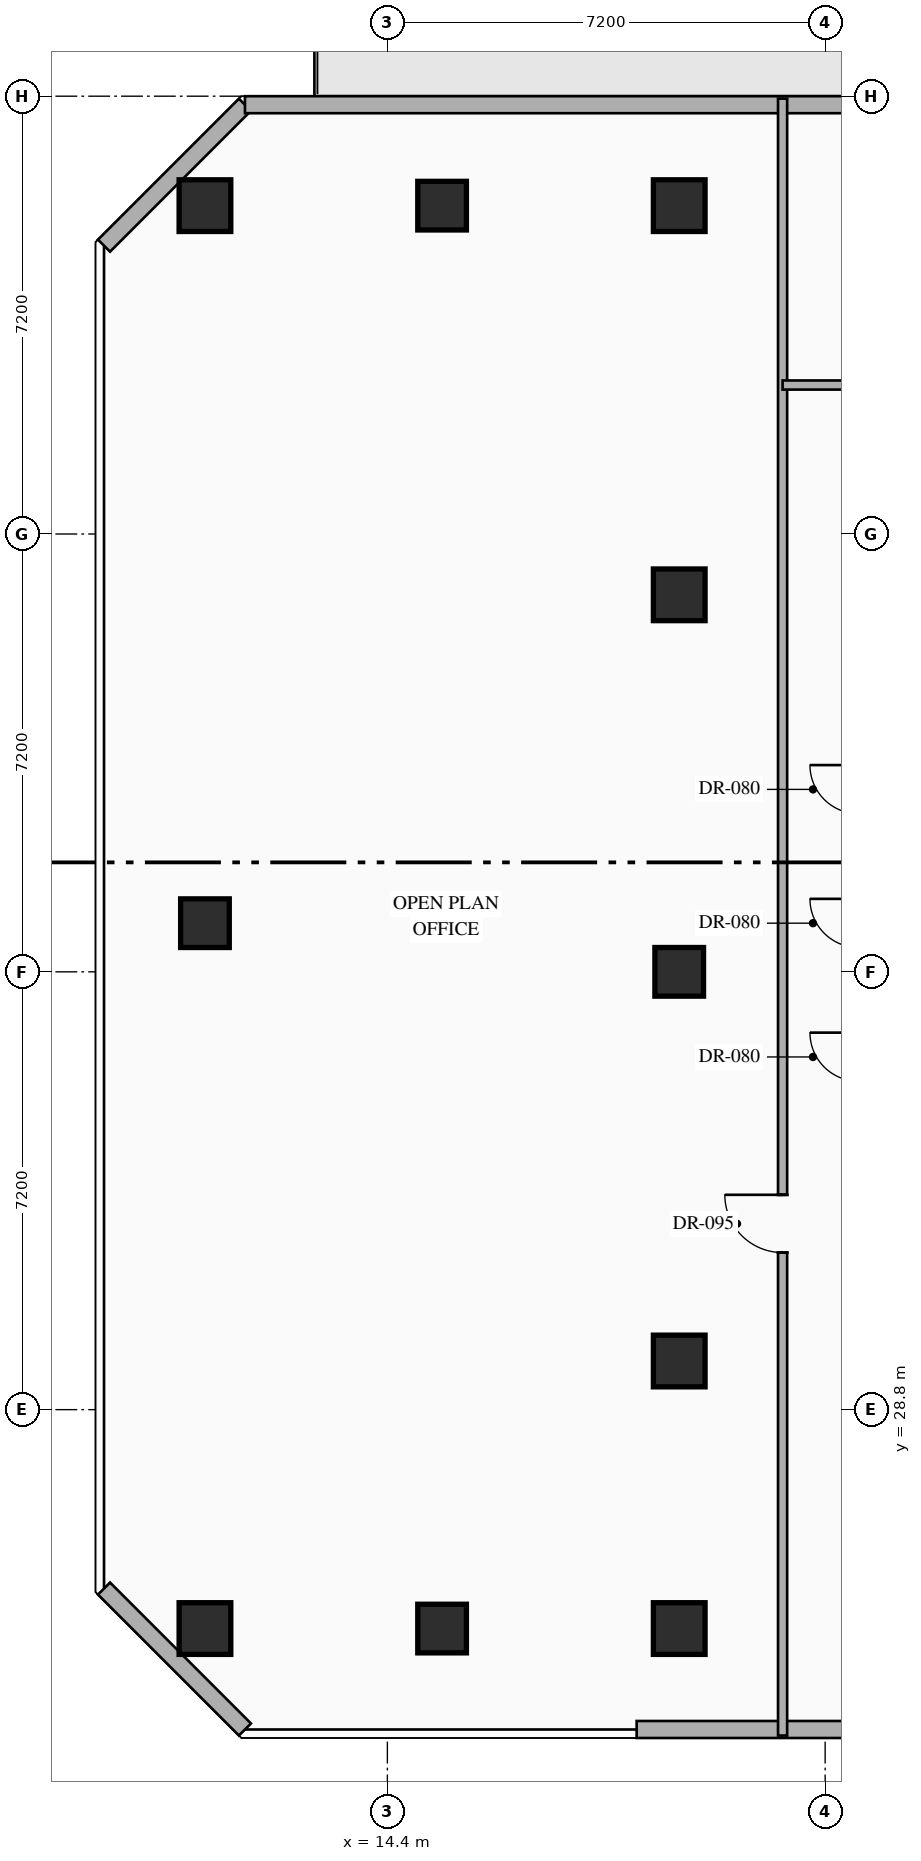
"""IFC4 building model, lengths in metres.
Left out: names, types, materials, properties, quantities, classifications, styles, units other than length and angle.
Written with IfcOpenShell. Run it as: python <this file> out.ifc"""

import sys

from ifc_helpers import new_model, si_unit, direction, frame, frame_2d, origin, origin_2d, place, context, subcontext, project, spatial, rectangle, hollow_rectangle, extrude, element, fill, save


model = new_model("IFC4")
c1 = context("Model", 3, precision=1e-05, world=origin(), true_north=direction((0.0, 1.0)))
c2 = subcontext(c1, "Body", "Model", "MODEL_VIEW")
j1 = project(units=[si_unit("LENGTHUNIT", "METRE"), si_unit("PLANEANGLEUNIT", "RADIAN")], contexts=[c1])
p1 = place(None, origin())
s1 = spatial("IfcSite", under=j1, at=p1, CompositionType="ELEMENT")
p2 = place(p1, origin())
s2 = spatial("IfcBuilding", under=s1, at=p2, CompositionType="ELEMENT")
p3 = place(p2, frame((0.0, 0.0, 134.85)))
s3 = spatial("IfcBuildingStorey", under=s2, at=p3, CompositionType="ELEMENT", Elevation=134.85)
for number, where, z_axis, x_axis in (
    (1, (11.4, 25.2, 0.0), (0.0, 0.0, 1.0), (1.0, 0.0, 0.0)),
    (2, (11.4, 48.6, 0.0), (0.0, 0.0, 1.0), (1.0, 0.0, 0.0)),
    (3, (19.2, 48.6, 0.0), (0.0, 0.0, 1.0), (1.0, 0.0, 0.0)),
    (4, (19.2, 25.2, 0.0), (0.0, 0.0, 1.0), (1.0, 0.0, 0.0)),
    (5, (19.2, 29.6, 0.0), (0.0, 0.0, 1.0), (1.0, 0.0, 0.0)),
    (6, (19.2, 42.2, 0.0), (0.0, 0.0, 1.0), (1.0, 0.0, 0.0)),
):
    element("IfcColumn", number, at=place(p3, frame(where, z_axis=z_axis, x_axis=x_axis)), inside=s3, PredefinedType="COLUMN", context=c2, shape_type="SweptSolid", body=[
        extrude(hollow_rectangle(XDim=0.85, YDim=0.85, WallThickness=0.032, at=origin_2d()), origin(), (0.0, 0.0, 1.0), 3.6),
    ])
for number, where, z_axis, x_axis in (
    (7, (11.4, 36.8, 0.0), (0.0, 0.0, 1.0), (1.0, 0.0, 0.0)),
    (8, (19.2, 36.0, 0.0), (0.0, 0.0, 1.0), (1.0, 0.0, 0.0)),
    (9, (15.3, 25.2, 0.0), (0.0, 0.0, 1.0), (1.0, 0.0, 0.0)),
    (10, (15.3, 48.6, 0.0), (0.0, 0.0, 1.0), (1.0, 0.0, 0.0)),
):
    element("IfcColumn", number, at=place(p3, frame(where, z_axis=z_axis, x_axis=x_axis)), inside=s3, PredefinedType="COLUMN", context=c2, shape_type="SweptSolid", body=[
        extrude(hollow_rectangle(XDim=0.8, YDim=0.8, WallThickness=0.032, at=origin_2d()), origin(), (0.0, 0.0, 1.0), 3.6),
    ])
p4 = place(p3, frame((25.247, 23.54, 0.0), z_axis=(0.0, 0.0, 1.0), x_axis=(-1.0, 0.0, 0.0)))
e11 = element("IfcWall", 11, at=p4, inside=s3, PredefinedType="STANDARD", context=c2, shape_type="SweptSolid", body=[
    extrude(rectangle(XDim=6.747, YDim=0.28, at=frame_2d((3.374, 0.0))), origin(), (0.0, 0.0, 1.0), 3.35),
])
p5 = place(p3, frame((12.058, 23.54, 0.0), z_axis=(0.0, 0.0, 1.0), x_axis=(-0.707144017911, 0.707069542501, 0.0)))
e12 = element("IfcWall", 12, at=p5, inside=s3, PredefinedType="STANDARD", context=c2, shape_type="SweptSolid", body=[
    extrude(rectangle(XDim=3.278, YDim=0.28, at=frame_2d((1.639, 0.0))), origin(), (0.0, 0.0, 1.0), 3.35),
])
p6 = place(p3, frame((9.74, 47.942, 0.0), z_axis=(0.0, 0.0, 1.0), x_axis=(0.707106781187, 0.707106781187, 0.0)))
e13 = element("IfcWall", 13, at=p6, inside=s3, PredefinedType="STANDARD", context=c2, shape_type="SweptSolid", body=[
    extrude(rectangle(XDim=3.278, YDim=0.28, at=frame_2d((1.639, 0.0))), origin(), (0.0, 0.0, 1.0), 3.35),
])
p7 = place(p3, frame((12.058, 50.26, 0.0), z_axis=(0.0, 0.0, 1.0), x_axis=(1.0, 0.0, 0.0)))
e14 = element("IfcWall", 14, at=p7, inside=s3, PredefinedType="STANDARD", context=c2, shape_type="SweptSolid", body=[
    extrude(rectangle(XDim=30.484, YDim=0.28, at=frame_2d((15.242, 0.0))), origin(), (0.0, 0.0, 1.0), 3.35),
])
p8 = place(p7, frame((14.992, 0.0, 0.0)))
e15 = element("IfcOpeningElement", 15, at=p8, cuts=e14, PredefinedType="OPENING", context=c2, shape_type="SweptSolid", body=[
    extrude(rectangle(XDim=1.1, YDim=2.2, at=frame_2d((0.55, 1.1))), frame((0.0, 0.15, 0.0), z_axis=(0.0, -1.0, 0.0), x_axis=(1.0, 0.0, 0.0)), (0.0, 0.0, 1.0), 0.3),
])
p9 = place(p7, frame((10.074, 0.0, 0.85)))
e16 = element("IfcOpeningElement", 16, at=p9, cuts=e14, PredefinedType="OPENING", context=c2, shape_type="SweptSolid", body=[
    extrude(rectangle(XDim=1.8, YDim=2.1, at=frame_2d((0.9, 1.05))), frame((0.0, 0.15, 0.0), z_axis=(0.0, -1.0, 0.0), x_axis=(1.0, 0.0, 0.0)), (0.0, 0.0, 1.0), 0.3),
])
p10 = place(p3, frame((20.9, 23.44, 0.0), z_axis=(0.0, 0.0, 1.0), x_axis=(0.0, 1.0, 0.0)))
e17 = element("IfcWall", 17, at=p10, inside=s3, PredefinedType="PARTITIONING", context=c2, shape_type="SweptSolid", body=[
    extrude(rectangle(XDim=26.92, YDim=0.15, at=frame_2d((13.46, 0.0))), origin(), (0.0, 0.0, 1.0), 3.35),
])
p11 = place(p10, frame((7.943, 0.0, 0.0)))
e18 = element("IfcOpeningElement", 18, at=p11, cuts=e17, PredefinedType="OPENING", context=c2, shape_type="SweptSolid", body=[
    extrude(rectangle(XDim=0.95, YDim=2.15, at=frame_2d((0.475, 1.075))), frame((0.0, 0.085, 0.0), z_axis=(0.0, -1.0, 0.0), x_axis=(1.0, 0.0, 0.0)), (0.0, 0.0, 1.0), 0.17),
])
p12 = place(p3, frame((20.9, 45.65, 0.0), z_axis=(0.0, 0.0, 1.0), x_axis=(1.0, 0.0, 0.0)))
e19 = element("IfcWall", 19, at=p12, inside=s3, PredefinedType="PARTITIONING", context=c2, shape_type="SweptSolid", body=[
    extrude(rectangle(XDim=24.06, YDim=0.15, at=frame_2d((12.03, 0.0))), origin(), (0.0, 0.0, 1.0), 2.695),
])
p13 = place(p12, frame((9.32, 0.0, 0.0)))
e20 = element("IfcOpeningElement", 20, at=p13, cuts=e19, PredefinedType="OPENING", context=c2, shape_type="SweptSolid", body=[
    extrude(rectangle(XDim=0.95, YDim=2.15, at=frame_2d((0.475, 1.075))), frame((0.0, 0.085, 0.0), z_axis=(0.0, -1.0, 0.0), x_axis=(1.0, 0.0, 0.0)), (0.0, 0.0, 1.0), 0.17),
])
p14 = place(p11, origin())
e21 = element("IfcDoor", 21, at=p14, inside=s3, OperationType="SINGLE_SWING_RIGHT", PredefinedType="DOOR", context=c2, shape_type="SweptSolid", body=[
    extrude(rectangle(XDim=0.95, YDim=2.15, at=frame_2d((0.475, 1.075))), frame((0.0, 0.025, 0.0), z_axis=(0.0, -1.0, 0.0), x_axis=(1.0, 0.0, 0.0)), (0.0, 0.0, 1.0), 0.05),
])
fill(e18, e21)
save(model, sys.argv[1])
